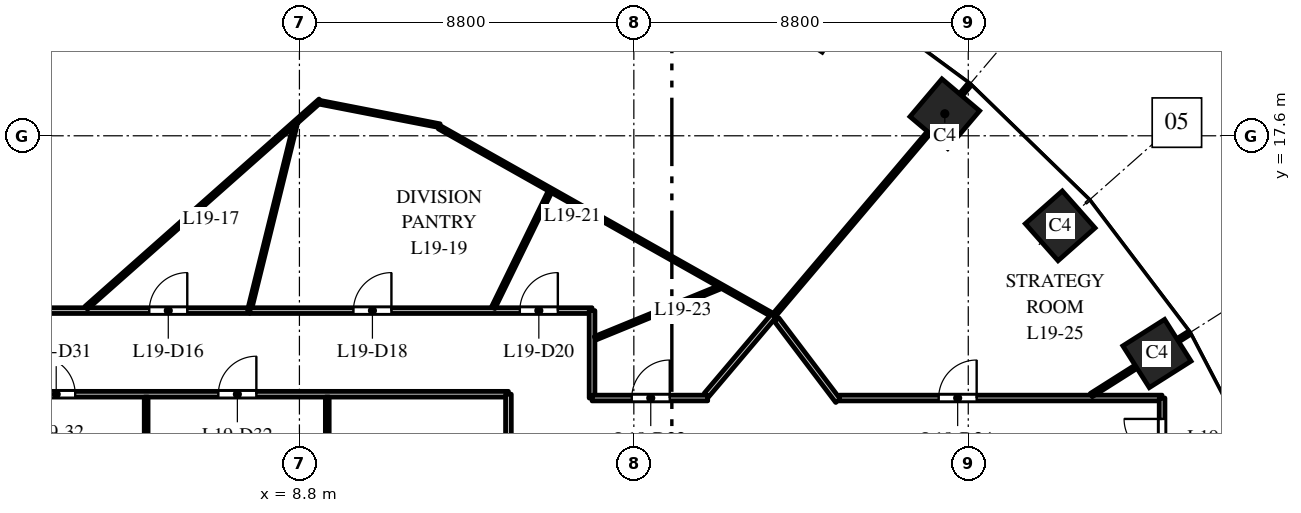
"""IFC4 building model, lengths in metres.
Left out: names, types, materials, properties, quantities, classifications, styles, units other than length and angle.
Written with IfcOpenShell. Run it as: python <this file> out.ifc"""

import sys

from ifc_helpers import new_model, si_unit, direction, frame, frame_2d, origin, origin_2d, place, context, subcontext, project, spatial, rectangle, extrude, element, fill, save


model = new_model("IFC4")
c1 = context("Model", 3, precision=1e-05, world=origin(), true_north=direction((0.0, 1.0)))
c2 = subcontext(c1, "Body", "Model", "MODEL_VIEW")
j1 = project(units=[si_unit("LENGTHUNIT", "METRE"), si_unit("PLANEANGLEUNIT", "RADIAN")], contexts=[c1])
p1 = place(None, origin())
s1 = spatial("IfcSite", under=j1, at=p1, CompositionType="ELEMENT")
p2 = place(p1, origin())
s2 = spatial("IfcBuilding", under=s1, at=p2, CompositionType="ELEMENT")
p3 = place(p2, frame((0.0, 0.0, 88.0)))
s3 = spatial("IfcBuildingStorey", under=s2, at=p3, CompositionType="ELEMENT", Elevation=88.0)
for number, where, z_axis, x_axis in (
    (1, (31.365, 11.871, 0.0), (0.0, 0.0, 1.0), (-0.535, 0.845, 0.0)),
    (2, (28.819, 15.23, 0.0), (0.0, 0.0, 1.0), (-0.663, 0.749, 0.0)),
    (3, (25.783, 18.18, 0.0), (0.0, 0.0, 1.0), (-0.763, 0.646, 0.0)),
):
    element("IfcColumn", number, at=place(p3, frame(where, z_axis=z_axis, x_axis=x_axis)), inside=s3, PredefinedType="COLUMN", context=c2, shape_type="SweptSolid", body=[
        extrude(rectangle(XDim=1.3, YDim=1.3, at=origin_2d()), origin(), (0.0, 0.0, 1.0), 4.0),
    ])
p4 = place(p3, frame((-14.3, 10.8, 0.0), z_axis=(0.0, 0.0, 1.0), x_axis=(1.0, 0.0, 0.0)))
e4 = element("IfcWall", 4, at=p4, inside=s3, PredefinedType="PARTITIONING", context=c2, shape_type="SweptSolid", body=[
    extrude(rectangle(XDim=28.6, YDim=0.15, at=frame_2d((14.3, 0.0))), origin(), (0.0, 0.0, 1.0), 2.85),
])
p5 = place(p4, frame((11.433, 0.0, 0.0)))
e5 = element("IfcOpeningElement", 5, at=p5, cuts=e4, PredefinedType="OPENING", context=c2, shape_type="SweptSolid", body=[
    extrude(rectangle(XDim=1.0, YDim=2.1, at=frame_2d((0.5, 1.05))), frame((0.0, 0.085, 0.0), z_axis=(0.0, -1.0, 0.0), x_axis=(1.0, 0.0, 0.0)), (0.0, 0.0, 1.0), 0.17),
])
p6 = place(p4, frame((16.2, 0.0, 0.0)))
e6 = element("IfcOpeningElement", 6, at=p6, cuts=e4, PredefinedType="OPENING", context=c2, shape_type="SweptSolid", body=[
    extrude(rectangle(XDim=1.0, YDim=2.1, at=frame_2d((0.5, 1.05))), frame((0.0, 0.085, 0.0), z_axis=(0.0, -1.0, 0.0), x_axis=(1.0, 0.0, 0.0)), (0.0, 0.0, 1.0), 0.17),
])
p7 = place(p4, frame((20.967, 0.0, 0.0)))
e7 = element("IfcOpeningElement", 7, at=p7, cuts=e4, PredefinedType="OPENING", context=c2, shape_type="SweptSolid", body=[
    extrude(rectangle(XDim=1.0, YDim=2.1, at=frame_2d((0.5, 1.05))), frame((0.0, 0.085, 0.0), z_axis=(0.0, -1.0, 0.0), x_axis=(1.0, 0.0, 0.0)), (0.0, 0.0, 1.0), 0.17),
])
p8 = place(p3, frame((1.061, 13.0, 0.0), z_axis=(0.0, 0.0, 1.0), x_axis=(1.0, 0.0, 0.0)))
e8 = element("IfcWall", 8, at=p8, inside=s3, PredefinedType="PARTITIONING", context=c2, shape_type="SweptSolid", body=[
    extrude(rectangle(XDim=6.422, YDim=0.15, at=frame_2d((3.211, 0.0))), origin(), (0.0, 0.0, 1.0), 2.85),
])
p9 = place(p8, frame((3.788, 0.0, 0.0)))
e9 = element("IfcOpeningElement", 9, at=p9, cuts=e8, PredefinedType="OPENING", context=c2, shape_type="SweptSolid", body=[
    extrude(rectangle(XDim=1.0, YDim=2.1, at=frame_2d((0.5, 1.05))), frame((0.0, 0.085, 0.0), z_axis=(0.0, -1.0, 0.0), x_axis=(1.0, 0.0, 0.0)), (0.0, 0.0, 1.0), 0.17),
])
p10 = place(p3, frame((3.19, 13.074, 0.0), z_axis=(0.0, 0.0, 1.0), x_axis=(0.74859996253, 0.663021942397, 0.0)))
e10 = element("IfcWall", 10, at=p10, inside=s3, PredefinedType="PARTITIONING", context=c2, shape_type="SweptSolid", body=[
    extrude(rectangle(XDim=8.228, YDim=0.1, at=frame_2d((4.114, 0.0))), origin(), (0.0, 0.0, 1.0), 2.85),
])
p11 = place(p3, frame((4.767, 6.363, 0.0), z_axis=(0.0, 0.0, 1.0), x_axis=(0.0, 1.0, 0.0)))
e11 = element("IfcWall", 11, at=p11, inside=s3, PredefinedType="PARTITIONING", context=c2, shape_type="SweptSolid", body=[
    extrude(rectangle(XDim=4.362, YDim=0.1, at=frame_2d((2.181, 0.0))), origin(), (0.0, 0.0, 1.0), 2.85),
])
p12 = place(p3, frame((7.483, 13.0, 0.0), z_axis=(0.0, 0.0, 1.0), x_axis=(0.239743843509, 0.970836180568, 0.0)))
e12 = element("IfcWall", 12, at=p12, inside=s3, PredefinedType="PARTITIONING", context=c2, shape_type="SweptSolid", body=[
    extrude(rectangle(XDim=5.022, YDim=0.1, at=frame_2d((2.511, 0.0))), origin(), (0.0, 0.0, 1.0), 3.7),
])
p13 = place(p3, frame((7.499, 13.0, 0.0), z_axis=(0.0, 0.0, 1.0), x_axis=(1.0, 0.0, 0.0)))
e13 = element("IfcWall", 13, at=p13, inside=s3, PredefinedType="PARTITIONING", context=c2, shape_type="SweptSolid", body=[
    extrude(rectangle(XDim=9.001, YDim=0.15, at=frame_2d((4.5, 0.0))), origin(), (0.0, 0.0, 1.0), 2.85),
])
p14 = place(p13, frame((2.722, 0.0, 0.0)))
e14 = element("IfcOpeningElement", 14, at=p14, cuts=e13, PredefinedType="OPENING", context=c2, shape_type="SweptSolid", body=[
    extrude(rectangle(XDim=1.0, YDim=2.1, at=frame_2d((0.5, 1.05))), frame((0.0, 0.085, 0.0), z_axis=(0.0, -1.0, 0.0), x_axis=(1.0, 0.0, 0.0)), (0.0, 0.0, 1.0), 0.17),
])
p15 = place(p13, frame((7.101, 0.0, 0.0)))
e15 = element("IfcOpeningElement", 15, at=p15, cuts=e13, PredefinedType="OPENING", context=c2, shape_type="SweptSolid", body=[
    extrude(rectangle(XDim=1.0, YDim=2.1, at=frame_2d((0.5, 1.05))), frame((0.0, 0.085, 0.0), z_axis=(0.0, -1.0, 0.0), x_axis=(1.0, 0.0, 0.0)), (0.0, 0.0, 1.0), 0.17),
])
p16 = place(p3, frame((9.364, 18.475, 0.0), z_axis=(0.0, 0.0, 1.0), x_axis=(0.98152602631, -0.191328669247, 0.0)))
e16 = element("IfcWall", 16, at=p16, inside=s3, PredefinedType="PARTITIONING", context=c2, shape_type="SweptSolid", body=[
    extrude(rectangle(XDim=3.189, YDim=0.1, at=frame_2d((1.594, 0.0))), origin(), (0.0, 0.0, 1.0), 2.85),
])
p17 = place(p3, frame((9.533, -10.725, 0.0), z_axis=(0.0, 0.0, 1.0), x_axis=(0.0, 1.0, 0.0)))
e17 = element("IfcWall", 17, at=p17, inside=s3, PredefinedType="PARTITIONING", context=c2, shape_type="SweptSolid", body=[
    extrude(rectangle(XDim=21.45, YDim=0.1, at=frame_2d((10.725, 0.0))), origin(), (0.0, 0.0, 1.0), 2.75),
])
p18 = place(p3, frame((12.48, 17.825, 0.0), z_axis=(0.0, 0.0, 1.0), x_axis=(0.871131718637, -0.491049415827, 0.0)))
e18 = element("IfcWall", 18, at=p18, inside=s3, PredefinedType="PARTITIONING", context=c2, shape_type="SweptSolid", body=[
    extrude(rectangle(XDim=10.101, YDim=0.1, at=frame_2d((5.05, 0.0))), origin(), (0.0, 0.0, 1.0), 3.7),
])
p19 = place(p3, frame((13.899, 13.075, 0.0), z_axis=(0.0, 0.0, 1.0), x_axis=(0.439170148288, 0.898403907412, 0.0)))
e19 = element("IfcWall", 19, at=p19, inside=s3, PredefinedType="PARTITIONING", context=c2, shape_type="SweptSolid", body=[
    extrude(rectangle(XDim=3.395, YDim=0.1, at=frame_2d((1.698, 0.0))), origin(), (0.0, 0.0, 1.0), 3.7),
])
p20 = place(p3, frame((14.3, -10.8, 0.0), z_axis=(0.0, 0.0, 1.0), x_axis=(0.0, 1.0, 0.0)))
e20 = element("IfcWall", 20, at=p20, inside=s3, PredefinedType="PARTITIONING", context=c2, shape_type="SweptSolid", body=[
    extrude(rectangle(XDim=21.6, YDim=0.15, at=frame_2d((10.8, 0.0))), origin(), (0.0, 0.0, 1.0), 2.75),
])
p21 = place(p20, frame((10.2, 0.0, 0.0)))
e21 = element("IfcOpeningElement", 21, at=p21, cuts=e20, PredefinedType="OPENING", context=c2, shape_type="SweptSolid", body=[
    extrude(rectangle(XDim=1.0, YDim=2.1, at=frame_2d((0.5, 1.05))), frame((0.0, 0.085, 0.0), z_axis=(0.0, -1.0, 0.0), x_axis=(1.0, 0.0, 0.0)), (0.0, 0.0, 1.0), 0.17),
])
p22 = place(p3, frame((16.5, 10.7, 0.0), z_axis=(0.0, 0.0, 1.0), x_axis=(0.0, 1.0, 0.0)))
e22 = element("IfcWall", 22, at=p22, inside=s3, PredefinedType="PARTITIONING", context=c2, shape_type="SweptSolid", body=[
    extrude(rectangle(XDim=2.3, YDim=0.15, at=frame_2d((1.15, 0.0))), origin(), (0.0, 0.0, 1.0), 3.7),
])
p23 = place(p3, frame((16.5, 10.7, 0.0), z_axis=(0.0, 0.0, 1.0), x_axis=(1.0, 0.0, 0.0)))
e23 = element("IfcWall", 23, at=p23, inside=s3, PredefinedType="PARTITIONING", context=c2, shape_type="SweptSolid", body=[
    extrude(rectangle(XDim=3.043, YDim=0.15, at=frame_2d((1.521, 0.0))), origin(), (0.0, 0.0, 1.0), 3.7),
])
p24 = place(p23, frame((1.045, 0.0, 0.0)))
e24 = element("IfcOpeningElement", 24, at=p24, cuts=e23, PredefinedType="OPENING", context=c2, shape_type="SweptSolid", body=[
    extrude(rectangle(XDim=1.0, YDim=2.1, at=frame_2d((0.5, 1.05))), frame((0.0, 0.085, 0.0), z_axis=(0.0, -1.0, 0.0), x_axis=(1.0, 0.0, 0.0)), (0.0, 0.0, 1.0), 0.17),
])
p25 = place(p3, frame((16.579, 12.271, 0.0), z_axis=(0.0, 0.0, 1.0), x_axis=(0.925511782592, 0.378718814272, 0.0)))
e25 = element("IfcWall", 25, at=p25, inside=s3, PredefinedType="PARTITIONING", context=c2, shape_type="SweptSolid", body=[
    extrude(rectangle(XDim=3.539, YDim=0.1, at=frame_2d((1.769, 0.0))), origin(), (0.0, 0.0, 1.0), 3.7),
])
p26 = place(p3, frame((19.511, 10.778, 0.0), z_axis=(0.0, 0.0, 1.0), x_axis=(0.64641426768, 0.762986628021, 0.0)))
e26 = element("IfcWall", 26, at=p26, inside=s3, PredefinedType="PARTITIONING", context=c2, shape_type="SweptSolid", body=[
    extrude(rectangle(XDim=2.735, YDim=0.15, at=frame_2d((1.368, 0.0))), origin(), (0.0, 0.0, 1.0), 3.7),
])
p27 = place(p3, frame((21.355, 12.765, 0.0), z_axis=(0.0, 0.0, 1.0), x_axis=(0.603391001626, -0.797445483502, 0.0)))
e27 = element("IfcWall", 27, at=p27, inside=s3, PredefinedType="PARTITIONING", context=c2, shape_type="SweptSolid", body=[
    extrude(rectangle(XDim=2.68, YDim=0.15, at=frame_2d((1.34, 0.0))), origin(), (0.0, 0.0, 1.0), 2.75),
])
p28 = place(p3, frame((21.279, 12.865, 0.0), z_axis=(0.0, 0.0, 1.0), x_axis=(0.646395355102, 0.763002650652, 0.0)))
e28 = element("IfcWall", 28, at=p28, inside=s3, PredefinedType="PARTITIONING", context=c2, shape_type="SweptSolid", body=[
    extrude(rectangle(XDim=7.969, YDim=0.1, at=frame_2d((3.984, 0.0))), origin(), (0.0, 0.0, 1.0), 2.9),
])
p29 = place(p3, frame((23.011, 10.7, 0.0), z_axis=(0.0, 0.0, 1.0), x_axis=(1.0, 0.0, 0.0)))
e29 = element("IfcWall", 29, at=p29, inside=s3, PredefinedType="PARTITIONING", context=c2, shape_type="SweptSolid", body=[
    extrude(rectangle(XDim=8.489, YDim=0.15, at=frame_2d((4.245, 0.0))), origin(), (0.0, 0.0, 1.0), 2.9),
])
p30 = place(p29, frame((2.61, 0.0, 0.0)))
e30 = element("IfcOpeningElement", 30, at=p30, cuts=e29, PredefinedType="OPENING", context=c2, shape_type="SweptSolid", body=[
    extrude(rectangle(XDim=1.0, YDim=2.1, at=frame_2d((0.5, 1.05))), frame((0.0, 0.085, 0.0), z_axis=(0.0, -1.0, 0.0), x_axis=(1.0, 0.0, 0.0)), (0.0, 0.0, 1.0), 0.17),
])
p31 = place(p3, frame((29.637, 10.777, 0.0), z_axis=(0.0, 0.0, 1.0), x_axis=(0.844810627195, 0.535065420467, 0.0)))
e31 = element("IfcWall", 31, at=p31, inside=s3, PredefinedType="PARTITIONING", context=c2, shape_type="SweptSolid", body=[
    extrude(rectangle(XDim=3.048, YDim=0.1, at=frame_2d((1.524, 0.0))), origin(), (0.0, 0.0, 1.0), 2.9),
])
p32 = place(p3, frame((31.5, 8.5, 0.0), z_axis=(0.0, 0.0, 1.0), x_axis=(0.0, 1.0, 0.0)))
e32 = element("IfcWall", 32, at=p32, inside=s3, PredefinedType="PARTITIONING", context=c2, shape_type="SweptSolid", body=[
    extrude(rectangle(XDim=2.2, YDim=0.15, at=frame_2d((1.1, 0.0))), origin(), (0.0, 0.0, 1.0), 2.9),
])
p33 = place(p32, frame((0.65, 0.0, 0.0)))
e33 = element("IfcOpeningElement", 33, at=p33, cuts=e32, PredefinedType="OPENING", context=c2, shape_type="SweptSolid", body=[
    extrude(rectangle(XDim=1.0, YDim=2.1, at=frame_2d((0.5, 1.05))), frame((0.0, 0.085, 0.0), z_axis=(0.0, -1.0, 0.0), x_axis=(1.0, 0.0, 0.0)), (0.0, 0.0, 1.0), 0.17),
])
p34 = place(p9, origin())
e34 = element("IfcDoor", 34, at=p34, inside=s3, OperationType="SINGLE_SWING_RIGHT", PredefinedType="DOOR", context=c2, shape_type="SweptSolid", body=[
    extrude(rectangle(XDim=1.0, YDim=2.1, at=frame_2d((0.5, 1.05))), frame((0.0, 0.025, 0.0), z_axis=(0.0, -1.0, 0.0), x_axis=(1.0, 0.0, 0.0)), (0.0, 0.0, 1.0), 0.05),
])
fill(e9, e34)
p35 = place(p14, origin())
e35 = element("IfcDoor", 35, at=p35, inside=s3, OperationType="SINGLE_SWING_RIGHT", PredefinedType="DOOR", context=c2, shape_type="SweptSolid", body=[
    extrude(rectangle(XDim=1.0, YDim=2.1, at=frame_2d((0.5, 1.05))), frame((0.0, 0.025, 0.0), z_axis=(0.0, -1.0, 0.0), x_axis=(1.0, 0.0, 0.0)), (0.0, 0.0, 1.0), 0.05),
])
fill(e14, e35)
p36 = place(p15, origin())
e36 = element("IfcDoor", 36, at=p36, inside=s3, OperationType="SINGLE_SWING_RIGHT", PredefinedType="DOOR", context=c2, shape_type="SweptSolid", body=[
    extrude(rectangle(XDim=1.0, YDim=2.1, at=frame_2d((0.5, 1.05))), frame((0.0, 0.025, 0.0), z_axis=(0.0, -1.0, 0.0), x_axis=(1.0, 0.0, 0.0)), (0.0, 0.0, 1.0), 0.05),
])
fill(e15, e36)
p37 = place(p24, origin())
e37 = element("IfcDoor", 37, at=p37, inside=s3, OperationType="SINGLE_SWING_RIGHT", PredefinedType="DOOR", context=c2, shape_type="SweptSolid", body=[
    extrude(rectangle(XDim=1.0, YDim=2.1, at=frame_2d((0.5, 1.05))), frame((0.0, 0.025, 0.0), z_axis=(0.0, -1.0, 0.0), x_axis=(1.0, 0.0, 0.0)), (0.0, 0.0, 1.0), 0.05),
])
fill(e24, e37)
p38 = place(p30, origin())
e38 = element("IfcDoor", 38, at=p38, inside=s3, OperationType="SINGLE_SWING_RIGHT", PredefinedType="DOOR", context=c2, shape_type="SweptSolid", body=[
    extrude(rectangle(XDim=1.0, YDim=2.1, at=frame_2d((0.5, 1.05))), frame((0.0, 0.025, 0.0), z_axis=(0.0, -1.0, 0.0), x_axis=(1.0, 0.0, 0.0)), (0.0, 0.0, 1.0), 0.05),
])
fill(e30, e38)
p39 = place(p33, origin())
e39 = element("IfcDoor", 39, at=p39, inside=s3, OperationType="SINGLE_SWING_RIGHT", PredefinedType="DOOR", context=c2, shape_type="SweptSolid", body=[
    extrude(rectangle(XDim=1.0, YDim=2.1, at=frame_2d((0.5, 1.05))), frame((0.0, 0.025, 0.0), z_axis=(0.0, -1.0, 0.0), x_axis=(1.0, 0.0, 0.0)), (0.0, 0.0, 1.0), 0.05),
])
fill(e33, e39)
p40 = place(p6, origin())
e40 = element("IfcDoor", 40, at=p40, inside=s3, OperationType="SINGLE_SWING_LEFT", PredefinedType="DOOR", context=c2, shape_type="SweptSolid", body=[
    extrude(rectangle(XDim=1.0, YDim=2.1, at=frame_2d((0.5, 1.05))), frame((0.0, 0.025, 0.0), z_axis=(0.0, -1.0, 0.0), x_axis=(1.0, 0.0, 0.0)), (0.0, 0.0, 1.0), 0.05),
])
fill(e6, e40)
p41 = place(p7, origin())
e41 = element("IfcDoor", 41, at=p41, inside=s3, OperationType="SINGLE_SWING_RIGHT", PredefinedType="DOOR", context=c2, shape_type="SweptSolid", body=[
    extrude(rectangle(XDim=1.0, YDim=2.1, at=frame_2d((0.5, 1.05))), frame((0.0, 0.025, 0.0), z_axis=(0.0, -1.0, 0.0), x_axis=(1.0, 0.0, 0.0)), (0.0, 0.0, 1.0), 0.05),
])
fill(e7, e41)
save(model, sys.argv[1])
